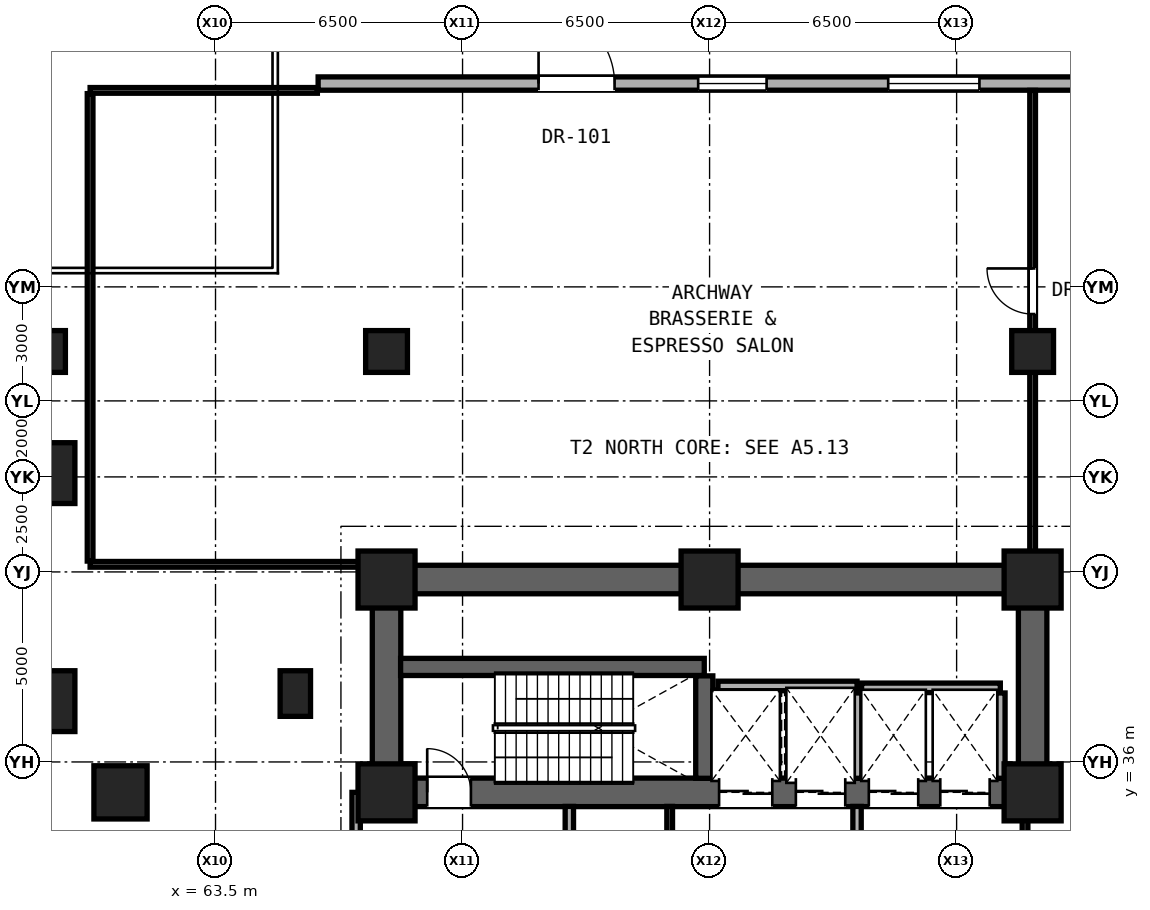
"""IFC4 building model, lengths in metres.
Left out: names, types, materials, properties, quantities, classifications, styles, units other than length and angle.
Written with IfcOpenShell. Run it as: python <this file> out.ifc"""

import sys

from ifc_helpers import new_model, si_unit, direction, frame, frame_2d, origin, origin_2d, place, context, subcontext, project, spatial, rectangle, hollow_rectangle, extrude, element, fill, save


model = new_model("IFC4")
c1 = context("Model", 3, precision=1e-05, world=origin(), true_north=direction((0.0, 1.0)))
c2 = subcontext(c1, "Body", "Model", "MODEL_VIEW")
j1 = project(units=[si_unit("LENGTHUNIT", "METRE"), si_unit("PLANEANGLEUNIT", "RADIAN")], contexts=[c1])
p1 = place(None, origin())
s1 = spatial("IfcSite", under=j1, at=p1, CompositionType="ELEMENT")
p2 = place(p1, origin())
s2 = spatial("IfcBuilding", under=s1, at=p2, CompositionType="ELEMENT")
p3 = place(p2, origin())
s3 = spatial("IfcBuildingStorey", under=s2, at=p3, CompositionType="ELEMENT", Elevation=0.0)
for number, where, z_axis, x_axis in (
    (1, (68.0, 35.2, 0.0), (0.0, 0.0, 1.0), (1.0, 0.0, 0.0)),
    (2, (85.0, 35.2, 0.0), (0.0, 0.0, 1.0), (1.0, 0.0, 0.0)),
    (3, (68.0, 40.8, 0.0), (0.0, 0.0, 1.0), (1.0, 0.0, 0.0)),
    (4, (76.5, 40.8, 0.0), (0.0, 0.0, 1.0), (1.0, 0.0, 0.0)),
    (5, (85.0, 40.8, 0.0), (0.0, 0.0, 1.0), (1.0, 0.0, 0.0)),
):
    element("IfcColumn", number, at=place(p3, frame(where, z_axis=z_axis, x_axis=x_axis)), inside=s3, PredefinedType="COLUMN", context=c2, shape_type="SweptSolid", body=[
        extrude(rectangle(XDim=1.5, YDim=1.5, at=origin_2d()), origin(), (0.0, 0.0, 1.0), 5.2),
    ])
p4 = place(p3, frame((61.0, 35.2, 0.0), z_axis=(0.0, 0.0, 1.0), x_axis=(1.0, 0.0, 0.0)))
e6 = element("IfcColumn", 6, at=p4, inside=s3, PredefinedType="COLUMN", context=c2, shape_type="SweptSolid", body=[
    extrude(hollow_rectangle(XDim=1.4, YDim=1.4, WallThickness=0.08, at=origin_2d()), origin(), (0.0, 0.0, 1.0), 5.2),
])
p5 = place(p3, frame((65.6, 37.8, 0.0), z_axis=(0.0, 0.0, 1.0), x_axis=(1.0, 0.0, 0.0)))
e7 = element("IfcColumn", 7, at=p5, inside=s3, PredefinedType="PILASTER", context=c2, shape_type="SweptSolid", body=[
    extrude(rectangle(XDim=0.8, YDim=1.2, at=origin_2d()), origin(), (0.0, 0.0, 1.0), 5.2),
])
p6 = place(p3, frame((68.0, 40.8, 0.0), z_axis=(0.0, 0.0, 1.0), x_axis=(1.0, 0.0, 0.0)))
e8 = element("IfcWall", 8, at=p6, inside=s3, PredefinedType="SHEAR", context=c2, shape_type="SweptSolid", body=[
    extrude(rectangle(XDim=17.0, YDim=0.75, at=frame_2d((8.5, 0.0))), origin(), (0.0, 0.0, 1.0), 4.88),
])
for number, where, z_axis, x_axis in (
    (9, (68.0, 35.2, 0.0), (0.0, 0.0, 1.0), (0.0, 1.0, 0.0)),
    (10, (85.0, 35.2, 0.0), (0.0, 0.0, 1.0), (0.0, 1.0, 0.0)),
):
    element("IfcWall", number, at=place(p3, frame(where, z_axis=z_axis, x_axis=x_axis)), inside=s3, PredefinedType="SHEAR", context=c2, shape_type="SweptSolid", body=[
        extrude(rectangle(XDim=5.6, YDim=0.75, at=frame_2d((2.8, 0.0))), origin(), (0.0, 0.0, 1.0), 4.88),
    ])
p7 = place(p3, frame((68.0, 35.2, 0.0), z_axis=(0.0, 0.0, 1.0), x_axis=(1.0, 0.0, 0.0)))
e11 = element("IfcWall", 11, at=p7, inside=s3, PredefinedType="SHEAR", context=c2, shape_type="SweptSolid", body=[
    extrude(rectangle(XDim=17.0, YDim=0.75, at=frame_2d((8.5, 0.0))), origin(), (0.0, 0.0, 1.0), 4.88),
])
p8 = place(p7, frame((1.07, 0.0, 0.0)))
e12 = element("IfcOpeningElement", 12, at=p8, cuts=e11, PredefinedType="OPENING", context=c2, shape_type="SweptSolid", body=[
    extrude(rectangle(XDim=1.15, YDim=2.2, at=frame_2d((0.575, 1.1))), frame((0.0, 0.385, 0.0), z_axis=(0.0, -1.0, 0.0), x_axis=(1.0, 0.0, 0.0)), (0.0, 0.0, 1.0), 0.77),
])
p9 = place(p7, frame((8.75, 0.0, 0.0)))
e13 = element("IfcOpeningElement", 13, at=p9, cuts=e11, PredefinedType="OPENING", context=c2, shape_type="SweptSolid", body=[
    extrude(rectangle(XDim=1.4, YDim=2.35, at=frame_2d((0.7, 1.175))), frame((0.0, 0.385, 0.0), z_axis=(0.0, -1.0, 0.0), x_axis=(1.0, 0.0, 0.0)), (0.0, 0.0, 1.0), 0.77),
])
p10 = place(p7, frame((10.77, 0.0, 0.0)))
e14 = element("IfcOpeningElement", 14, at=p10, cuts=e11, PredefinedType="OPENING", context=c2, shape_type="SweptSolid", body=[
    extrude(rectangle(XDim=1.3, YDim=2.3, at=frame_2d((0.65, 1.15))), frame((0.0, 0.385, 0.0), z_axis=(0.0, -1.0, 0.0), x_axis=(1.0, 0.0, 0.0)), (0.0, 0.0, 1.0), 0.77),
])
p11 = place(p7, frame((12.69, 0.0, 0.0)))
e15 = element("IfcOpeningElement", 15, at=p11, cuts=e11, PredefinedType="OPENING", context=c2, shape_type="SweptSolid", body=[
    extrude(rectangle(XDim=1.3, YDim=2.3, at=frame_2d((0.65, 1.15))), frame((0.0, 0.385, 0.0), z_axis=(0.0, -1.0, 0.0), x_axis=(1.0, 0.0, 0.0)), (0.0, 0.0, 1.0), 0.77),
])
p12 = place(p7, frame((14.57, 0.0, 0.0)))
e16 = element("IfcOpeningElement", 16, at=p12, cuts=e11, PredefinedType="OPENING", context=c2, shape_type="SweptSolid", body=[
    extrude(rectangle(XDim=1.3, YDim=2.3, at=frame_2d((0.65, 1.15))), frame((0.0, 0.385, 0.0), z_axis=(0.0, -1.0, 0.0), x_axis=(1.0, 0.0, 0.0)), (0.0, 0.0, 1.0), 0.77),
])
for number, where, z_axis, x_axis in (
    (17, (59.0, 37.6, 0.0), (0.0, 0.0, 1.0), (1.0, 0.0, 0.0)),
    (18, (59.0, 43.6, 0.0), (0.0, 0.0, 1.0), (1.0, 0.0, 0.0)),
):
    element("IfcColumn", number, at=place(p3, frame(where, z_axis=z_axis, x_axis=x_axis)), inside=s3, PredefinedType="COLUMN", context=c2, shape_type="SweptSolid", body=[
        extrude(rectangle(XDim=1.6, YDim=1.6, at=origin_2d()), origin(), (0.0, 0.0, 1.0), 5.2),
    ])
for number, where, z_axis, x_axis in (
    (19, (59.0, 46.8, 0.0), (0.0, 0.0, 1.0), (1.0, 0.0, 0.0)),
    (20, (68.0, 46.8, 0.0), (0.0, 0.0, 1.0), (1.0, 0.0, 0.0)),
    (21, (85.0, 46.8, 0.0), (0.0, 0.0, 1.0), (1.0, 0.0, 0.0)),
):
    element("IfcColumn", number, at=place(p3, frame(where, z_axis=z_axis, x_axis=x_axis)), inside=s3, PredefinedType="COLUMN", context=c2, shape_type="SweptSolid", body=[
        extrude(rectangle(XDim=1.1, YDim=1.1, at=origin_2d()), origin(), (0.0, 0.0, 1.0), 5.2),
    ])
p13 = place(p3, frame((66.2, 53.85, 0.0), z_axis=(0.0, 0.0, 1.0), x_axis=(1.0, 0.0, 0.0)))
e22 = element("IfcWall", 22, at=p13, inside=s3, PredefinedType="SOLIDWALL", context=c2, shape_type="SweptSolid", body=[
    extrude(rectangle(XDim=27.6, YDim=0.35, at=frame_2d((13.8, 0.0))), origin(), (0.0, 0.0, 1.0), 4.86),
])
p14 = place(p13, frame((10.0, 0.0, 0.85)))
e23 = element("IfcOpeningElement", 23, at=p14, cuts=e22, PredefinedType="OPENING", context=c2, shape_type="SweptSolid", body=[
    extrude(rectangle(XDim=1.8, YDim=2.4, at=frame_2d((0.9, 1.2))), frame((0.0, 0.185, 0.0), z_axis=(0.0, -1.0, 0.0), x_axis=(1.0, 0.0, 0.0)), (0.0, 0.0, 1.0), 0.37),
])
p15 = place(p13, frame((15.0, 0.0, 0.85)))
e24 = element("IfcOpeningElement", 24, at=p15, cuts=e22, PredefinedType="OPENING", context=c2, shape_type="SweptSolid", body=[
    extrude(rectangle(XDim=2.4, YDim=2.6, at=frame_2d((1.2, 1.3))), frame((0.0, 0.185, 0.0), z_axis=(0.0, -1.0, 0.0), x_axis=(1.0, 0.0, 0.0)), (0.0, 0.0, 1.0), 0.37),
])
p16 = place(p13, frame((5.8, 0.0, 0.0)))
e25 = element("IfcOpeningElement", 25, at=p16, cuts=e22, PredefinedType="OPENING", context=c2, shape_type="SweptSolid", body=[
    extrude(rectangle(XDim=2.0, YDim=2.4, at=frame_2d((1.0, 1.2))), frame((0.0, 0.185, 0.0), z_axis=(0.0, -1.0, 0.0), x_axis=(1.0, 0.0, 0.0)), (0.0, 0.0, 1.0), 0.37),
])
p17 = place(p13, frame((24.9, 0.0, 0.0)))
e26 = element("IfcOpeningElement", 26, at=p17, cuts=e22, PredefinedType="OPENING", context=c2, shape_type="SweptSolid", body=[
    extrude(rectangle(XDim=2.0, YDim=2.4, at=frame_2d((1.0, 1.2))), frame((0.0, 0.185, 0.0), z_axis=(0.0, -1.0, 0.0), x_axis=(1.0, 0.0, 0.0)), (0.0, 0.0, 1.0), 0.37),
])
p18 = place(p3, frame((80.5, 37.95, 0.0), z_axis=(0.0, 0.0, 1.0), x_axis=(1.0, 0.0, 0.0)))
e27 = element("IfcWall", 27, at=p18, inside=s3, PredefinedType="SOLIDWALL", context=c2, shape_type="SweptSolid", body=[
    extrude(rectangle(XDim=3.65, YDim=0.25, at=frame_2d((1.825, 0.0))), origin(), (0.0, 0.0, 1.0), 4.88),
])
p19 = place(p3, frame((76.72, 38.0, 0.0), z_axis=(0.0, 0.0, 1.0), x_axis=(1.0, 0.0, 0.0)))
e28 = element("IfcWall", 28, at=p19, inside=s3, PredefinedType="SOLIDWALL", context=c2, shape_type="SweptSolid", body=[
    extrude(rectangle(XDim=3.66, YDim=0.25, at=frame_2d((1.83, 0.0))), origin(), (0.0, 0.0, 1.0), 4.88),
])
p20 = place(p3, frame((68.37, 38.5, 0.0), z_axis=(0.0, 0.0, 1.0), x_axis=(1.0, 0.0, 0.0)))
e29 = element("IfcWall", 29, at=p20, inside=s3, PredefinedType="SHEAR", context=c2, shape_type="SweptSolid", body=[
    extrude(rectangle(XDim=7.99, YDim=0.45, at=frame_2d((3.995, 0.0))), origin(), (0.0, 0.0, 1.0), 4.88),
])
p21 = place(p3, frame((60.2, 41.2, 0.0), z_axis=(0.0, 0.0, 1.0), x_axis=(1.0, 0.0, 0.0)))
e30 = element("IfcWall", 30, at=p21, inside=s3, PredefinedType="PARTITIONING", context=c2, shape_type="SweptSolid", body=[
    extrude(rectangle(XDim=7.78, YDim=0.15, at=frame_2d((3.89, 0.0))), origin(), (0.0, 0.0, 1.0), 3.924),
])
p22 = place(p3, frame((60.2, 53.67, 0.0), z_axis=(0.0, 0.0, 1.0), x_axis=(1.0, 0.0, 0.0)))
e31 = element("IfcWall", 31, at=p22, inside=s3, PredefinedType="PARTITIONING", context=c2, shape_type="SweptSolid", body=[
    extrude(rectangle(XDim=5.98, YDim=0.15, at=frame_2d((2.99, 0.0))), origin(), (0.0, 0.0, 1.0), 4.88),
])
p23 = place(p3, frame((60.2, 41.285, 0.0), z_axis=(0.0, 0.0, 1.0), x_axis=(0.0, 1.0, 0.0)))
e32 = element("IfcWall", 32, at=p23, inside=s3, PredefinedType="PARTITIONING", context=c2, shape_type="SweptSolid", body=[
    extrude(rectangle(XDim=12.3, YDim=0.15, at=frame_2d((6.15, 0.0))), origin(), (0.0, 0.0, 1.0), 3.924),
])
p24 = place(p3, frame((67.2, 32.02, 0.0), z_axis=(0.0, 0.0, 1.0), x_axis=(0.0, 1.0, 0.0)))
e33 = element("IfcWall", 33, at=p24, inside=s3, PredefinedType="SOLIDWALL", context=c2, shape_type="SweptSolid", body=[
    extrude(rectangle(XDim=3.18, YDim=0.22, at=frame_2d((1.59, 0.0))), origin(), (0.0, 0.0, 1.0), 3.772),
])
p25 = place(p3, frame((72.81, 32.02, 0.0), z_axis=(0.0, 0.0, 1.0), x_axis=(0.0, 1.0, 0.0)))
e34 = element("IfcWall", 34, at=p25, inside=s3, PredefinedType="SOLIDWALL", context=c2, shape_type="SweptSolid", body=[
    extrude(rectangle(XDim=2.81, YDim=0.22, at=frame_2d((1.405, 0.0))), origin(), (0.0, 0.0, 1.0), 4.88),
])
p26 = place(p25, frame((0.98, 0.0, 0.0)))
e35 = element("IfcOpeningElement", 35, at=p26, cuts=e34, PredefinedType="OPENING", context=c2, shape_type="SweptSolid", body=[
    extrude(rectangle(XDim=0.85, YDim=2.01, at=frame_2d((0.425, 1.005))), frame((0.0, 0.12, 0.0), z_axis=(0.0, -1.0, 0.0), x_axis=(1.0, 0.0, 0.0)), (0.0, 0.0, 1.0), 0.24),
])
p27 = place(p3, frame((75.45, 32.05, 0.0), z_axis=(0.0, 0.0, 1.0), x_axis=(0.0, 1.0, 0.0)))
e36 = element("IfcWall", 36, at=p27, inside=s3, PredefinedType="PARTITIONING", context=c2, shape_type="SweptSolid", body=[
    extrude(rectangle(XDim=2.78, YDim=0.15, at=frame_2d((1.39, 0.0))), origin(), (0.0, 0.0, 1.0), 4.88),
])
p28 = place(p3, frame((76.36, 35.57, 0.0), z_axis=(0.0, 0.0, 1.0), x_axis=(0.0, 1.0, 0.0)))
e37 = element("IfcWall", 37, at=p28, inside=s3, PredefinedType="SHEAR", context=c2, shape_type="SweptSolid", body=[
    extrude(rectangle(XDim=2.695, YDim=0.45, at=frame_2d((1.347, 0.0))), origin(), (0.0, 0.0, 1.0), 4.88),
])
p29 = place(p3, frame((80.38, 32.05, 0.0), z_axis=(0.0, 0.0, 1.0), x_axis=(0.0, 1.0, 0.0)))
e38 = element("IfcWall", 38, at=p29, inside=s3, PredefinedType="SOLIDWALL", context=c2, shape_type="SweptSolid", body=[
    extrude(rectangle(XDim=2.78, YDim=0.22, at=frame_2d((1.39, 0.0))), origin(), (0.0, 0.0, 1.0), 4.88),
])
for number, where, z_axis, x_axis in (
    (39, (80.38, 35.57, 0.0), (0.0, 0.0, 1.0), (0.0, 1.0, 0.0)),
    (40, (84.15, 35.57, 0.0), (0.0, 0.0, 1.0), (0.0, 1.0, 0.0)),
):
    element("IfcWall", number, at=place(p3, frame(where, z_axis=z_axis, x_axis=x_axis)), inside=s3, PredefinedType="SOLIDWALL", context=c2, shape_type="SweptSolid", body=[
        extrude(rectangle(XDim=2.245, YDim=0.25, at=frame_2d((1.123, 0.0))), origin(), (0.0, 0.0, 1.0), 4.88),
    ])
p30 = place(p3, frame((84.8, 32.02, 0.0), z_axis=(0.0, 0.0, 1.0), x_axis=(0.0, 1.0, 0.0)))
e41 = element("IfcWall", 41, at=p30, inside=s3, PredefinedType="PARTITIONING", context=c2, shape_type="SweptSolid", body=[
    extrude(rectangle(XDim=2.81, YDim=0.15, at=frame_2d((1.405, 0.0))), origin(), (0.0, 0.0, 1.0), 3.945),
])
p31 = place(p3, frame((85.0, 41.2, 0.0), z_axis=(0.0, 0.0, 1.0), x_axis=(0.0, 1.0, 0.0)))
e42 = element("IfcWall", 42, at=p31, inside=s3, PredefinedType="PARTITIONING", context=c2, shape_type="SweptSolid", body=[
    extrude(rectangle(XDim=12.47, YDim=0.15, at=frame_2d((6.235, 0.0))), origin(), (0.0, 0.0, 1.0), 4.016),
])
p32 = place(p31, frame((6.585, 0.0, 0.0)))
e43 = element("IfcOpeningElement", 43, at=p32, cuts=e42, PredefinedType="OPENING", context=c2, shape_type="SweptSolid", body=[
    extrude(rectangle(XDim=1.2, YDim=2.25, at=frame_2d((0.6, 1.125))), frame((0.0, 0.085, 0.0), z_axis=(0.0, -1.0, 0.0), x_axis=(1.0, 0.0, 0.0)), (0.0, 0.0, 1.0), 0.17),
])
p33 = place(p14, origin())
e44 = element("IfcWindow", 44, at=p33, inside=s3, PartitioningType="SINGLE_PANEL", PredefinedType="WINDOW", context=c2, shape_type="SweptSolid", body=[
    extrude(rectangle(XDim=1.8, YDim=2.4, at=frame_2d((0.9, 1.2))), frame((0.0, 0.03, 0.0), z_axis=(0.0, -1.0, 0.0), x_axis=(1.0, 0.0, 0.0)), (0.0, 0.0, 1.0), 0.06),
])
fill(e23, e44)
p34 = place(p15, origin())
e45 = element("IfcWindow", 45, at=p34, inside=s3, PartitioningType="SINGLE_PANEL", PredefinedType="WINDOW", context=c2, shape_type="SweptSolid", body=[
    extrude(rectangle(XDim=2.4, YDim=2.6, at=frame_2d((1.2, 1.3))), frame((0.0, 0.03, 0.0), z_axis=(0.0, -1.0, 0.0), x_axis=(1.0, 0.0, 0.0)), (0.0, 0.0, 1.0), 0.06),
])
fill(e24, e45)
p35 = place(p16, origin())
e46 = element("IfcDoor", 46, at=p35, inside=s3, OperationType="SINGLE_SWING_LEFT", PredefinedType="DOOR", context=c2, shape_type="SweptSolid", body=[
    extrude(rectangle(XDim=2.0, YDim=2.4, at=frame_2d((1.0, 1.2))), frame((0.0, 0.025, 0.0), z_axis=(0.0, -1.0, 0.0), x_axis=(1.0, 0.0, 0.0)), (0.0, 0.0, 1.0), 0.05),
])
fill(e25, e46)
p36 = place(p8, origin())
e47 = element("IfcDoor", 47, at=p36, inside=s3, OperationType="SINGLE_SWING_LEFT", PredefinedType="DOOR", context=c2, shape_type="SweptSolid", body=[
    extrude(rectangle(XDim=1.15, YDim=2.2, at=frame_2d((0.575, 1.1))), frame((0.0, 0.025, 0.0), z_axis=(0.0, -1.0, 0.0), x_axis=(1.0, 0.0, 0.0)), (0.0, 0.0, 1.0), 0.05),
])
fill(e12, e47)
p37 = place(p32, origin())
e48 = element("IfcDoor", 48, at=p37, inside=s3, OperationType="SINGLE_SWING_RIGHT", PredefinedType="DOOR", context=c2, shape_type="SweptSolid", body=[
    extrude(rectangle(XDim=1.2, YDim=2.25, at=frame_2d((0.6, 1.125))), frame((0.0, 0.025, 0.0), z_axis=(0.0, -1.0, 0.0), x_axis=(1.0, 0.0, 0.0)), (0.0, 0.0, 1.0), 0.05),
])
fill(e43, e48)
p38 = place(p9, origin())
e49 = element("IfcDoor", 49, at=p38, inside=s3, OperationType="DOUBLE_DOOR_SLIDING", PredefinedType="DOOR", context=c2, shape_type="SweptSolid", body=[
    extrude(rectangle(XDim=1.4, YDim=2.35, at=frame_2d((0.7, 1.175))), frame((0.0, 0.025, 0.0), z_axis=(0.0, -1.0, 0.0), x_axis=(1.0, 0.0, 0.0)), (0.0, 0.0, 1.0), 0.05),
])
fill(e13, e49)
p39 = place(p10, origin())
e50 = element("IfcDoor", 50, at=p39, inside=s3, OperationType="DOUBLE_DOOR_SLIDING", PredefinedType="DOOR", context=c2, shape_type="SweptSolid", body=[
    extrude(rectangle(XDim=1.3, YDim=2.3, at=frame_2d((0.65, 1.15))), frame((0.0, 0.025, 0.0), z_axis=(0.0, -1.0, 0.0), x_axis=(1.0, 0.0, 0.0)), (0.0, 0.0, 1.0), 0.05),
])
fill(e14, e50)
p40 = place(p11, origin())
e51 = element("IfcDoor", 51, at=p40, inside=s3, OperationType="DOUBLE_DOOR_SLIDING", PredefinedType="DOOR", context=c2, shape_type="SweptSolid", body=[
    extrude(rectangle(XDim=1.3, YDim=2.3, at=frame_2d((0.65, 1.15))), frame((0.0, 0.025, 0.0), z_axis=(0.0, -1.0, 0.0), x_axis=(1.0, 0.0, 0.0)), (0.0, 0.0, 1.0), 0.05),
])
fill(e15, e51)
p41 = place(p12, origin())
e52 = element("IfcDoor", 52, at=p41, inside=s3, OperationType="DOUBLE_DOOR_SLIDING", PredefinedType="DOOR", context=c2, shape_type="SweptSolid", body=[
    extrude(rectangle(XDim=1.3, YDim=2.3, at=frame_2d((0.65, 1.15))), frame((0.0, 0.025, 0.0), z_axis=(0.0, -1.0, 0.0), x_axis=(1.0, 0.0, 0.0)), (0.0, 0.0, 1.0), 0.05),
])
fill(e16, e52)
save(model, sys.argv[1])
